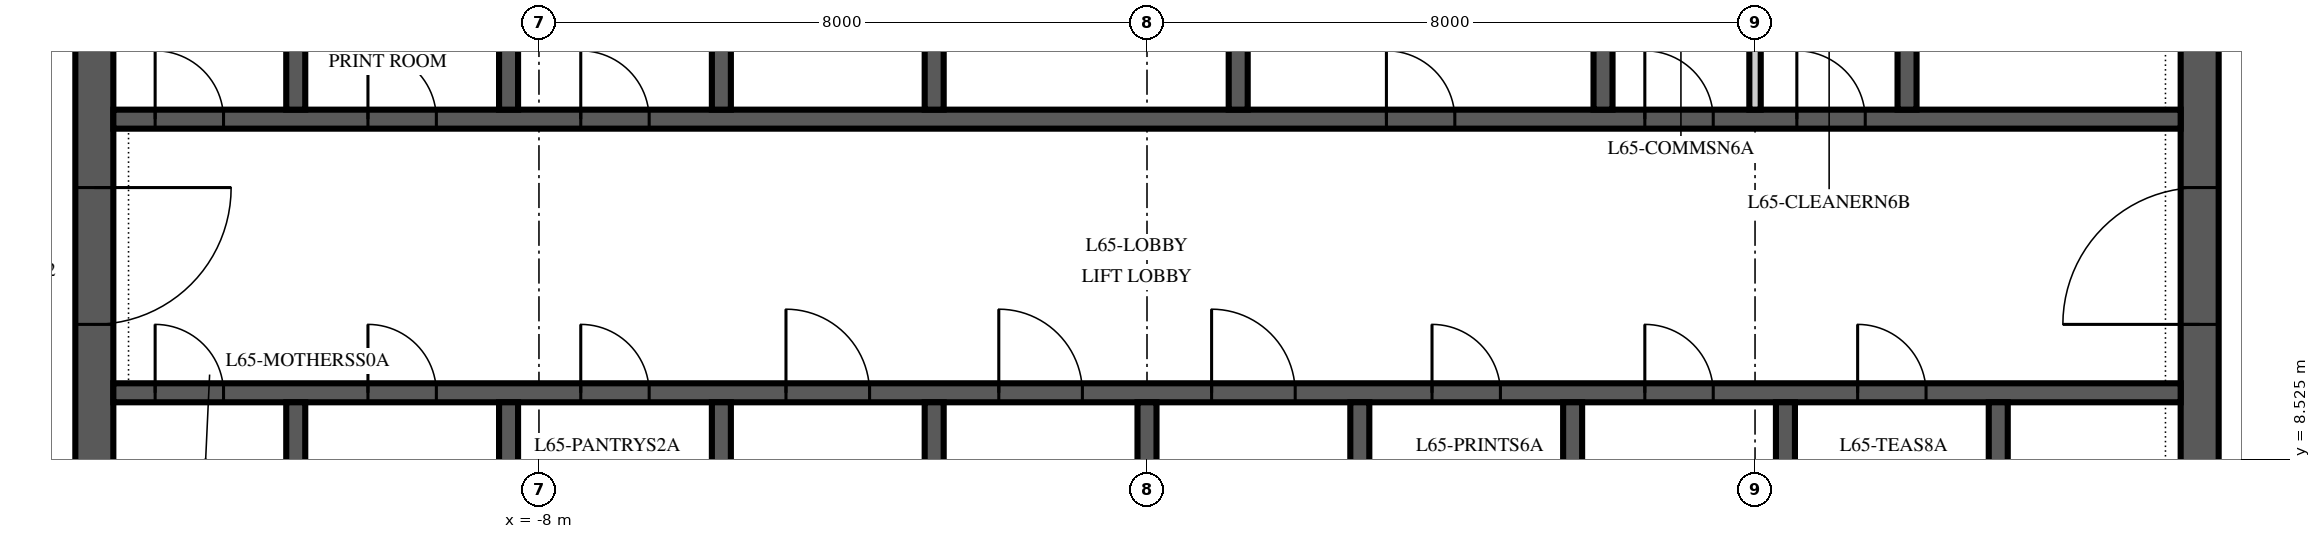
"""IFC4 building model, lengths in metres.
Left out: names, types, materials, properties, quantities, classifications, styles, units other than length and angle.
Written with IfcOpenShell. Run it as: python <this file> out.ifc"""

import sys

from ifc_helpers import new_model, si_unit, direction, frame, frame_2d, origin, place, context, subcontext, project, spatial, polyline, rectangle, outline, extrude, element, fill, save


model = new_model("IFC4")
c1 = context("Model", 3, precision=1e-05, world=origin(), true_north=direction((0.0, 1.0)))
c2 = subcontext(c1, "Body", "Model", "MODEL_VIEW")
j1 = project(units=[si_unit("LENGTHUNIT", "METRE"), si_unit("PLANEANGLEUNIT", "RADIAN")], contexts=[c1])
p1 = place(None, origin())
s1 = spatial("IfcSite", under=j1, at=p1, CompositionType="ELEMENT")
p2 = place(p1, origin())
s2 = spatial("IfcBuilding", under=s1, at=p2, CompositionType="ELEMENT")
p3 = place(p2, frame((0.0, 0.0, 280.0)))
s3 = spatial("IfcBuildingStorey", under=s2, at=p3, CompositionType="ELEMENT", Elevation=280.0)
p4 = place(p3, frame((13.85, 6.15, 0.0), z_axis=(0.0, 0.0, 1.0), x_axis=(0.0, 1.0, 0.0)))
e1 = element("IfcWall", 1, at=p4, inside=s3, PredefinedType="SHEAR", context=c2, shape_type="SweptSolid", body=[
    extrude(outline(polyline([(0.0, -0.25), (17.7, -0.25), (17.7, 0.0), (17.45, 0.0), (17.45, 0.25), (0.25, 0.25), (0.25, 0.0), (0.0, 0.0), (0.0, -0.25)])), origin(), (0.0, 0.0, 1.0), 4.0),
])
p5 = place(p4, frame((4.15, 0.0, 0.0)))
e2 = element("IfcOpeningElement", 2, at=p5, cuts=e1, PredefinedType="OPENING", context=c2, shape_type="SweptSolid", body=[
    extrude(rectangle(XDim=1.8, YDim=2.4, at=frame_2d((0.9, 1.2))), frame((0.0, 0.265, 0.0), z_axis=(0.0, -1.0, 0.0), x_axis=(1.0, 0.0, 0.0)), (0.0, 0.0, 1.0), 0.53),
])
p6 = place(p3, frame((-13.85, 23.85, 0.0), z_axis=(0.0, 0.0, 1.0), x_axis=(0.0, -1.0, 0.0)))
e3 = element("IfcWall", 3, at=p6, inside=s3, PredefinedType="SHEAR", context=c2, shape_type="SweptSolid", body=[
    extrude(outline(polyline([(0.0, -0.25), (17.7, -0.25), (17.7, 0.0), (17.45, 0.0), (17.45, 0.25), (0.25, 0.25), (0.25, 0.0), (0.0, 0.0), (0.0, -0.25)])), origin(), (0.0, 0.0, 1.0), 4.0),
])
p7 = place(p6, frame((11.75, 0.0, 0.0)))
e4 = element("IfcOpeningElement", 4, at=p7, cuts=e3, PredefinedType="OPENING", context=c2, shape_type="SweptSolid", body=[
    extrude(rectangle(XDim=1.8, YDim=2.4, at=frame_2d((0.9, 1.2))), frame((0.0, 0.265, 0.0), z_axis=(0.0, -1.0, 0.0), x_axis=(1.0, 0.0, 0.0)), (0.0, 0.0, 1.0), 0.53),
])
p8 = place(p3, frame((-13.6, 9.4, 0.0), z_axis=(0.0, 0.0, 1.0), x_axis=(1.0, 0.0, 0.0)))
e5 = element("IfcWall", 5, at=p8, inside=s3, PredefinedType="SHEAR", context=c2, shape_type="SweptSolid", body=[
    extrude(rectangle(XDim=27.2, YDim=0.25, at=frame_2d((13.6, 0.0))), origin(), (0.0, 0.0, 1.0), 4.0),
])
p9 = place(p8, frame((8.85, 0.0, 0.0)))
e6 = element("IfcOpeningElement", 6, at=p9, cuts=e5, PredefinedType="OPENING", context=c2, shape_type="SweptSolid", body=[
    extrude(rectangle(XDim=1.1, YDim=2.1, at=frame_2d((0.55, 1.05))), frame((0.0, 0.14, 0.0), z_axis=(0.0, -1.0, 0.0), x_axis=(1.0, 0.0, 0.0)), (0.0, 0.0, 1.0), 0.28),
])
p10 = place(p8, frame((11.65, 0.0, 0.0)))
e7 = element("IfcOpeningElement", 7, at=p10, cuts=e5, PredefinedType="OPENING", context=c2, shape_type="SweptSolid", body=[
    extrude(rectangle(XDim=1.1, YDim=2.1, at=frame_2d((0.55, 1.05))), frame((0.0, 0.14, 0.0), z_axis=(0.0, -1.0, 0.0), x_axis=(1.0, 0.0, 0.0)), (0.0, 0.0, 1.0), 0.28),
])
p11 = place(p8, frame((14.45, 0.0, 0.0)))
e8 = element("IfcOpeningElement", 8, at=p11, cuts=e5, PredefinedType="OPENING", context=c2, shape_type="SweptSolid", body=[
    extrude(rectangle(XDim=1.1, YDim=2.1, at=frame_2d((0.55, 1.05))), frame((0.0, 0.14, 0.0), z_axis=(0.0, -1.0, 0.0), x_axis=(1.0, 0.0, 0.0)), (0.0, 0.0, 1.0), 0.28),
])
p12 = place(p8, frame((0.55, 0.0, 0.0)))
e9 = element("IfcOpeningElement", 9, at=p12, cuts=e5, PredefinedType="OPENING", context=c2, shape_type="SweptSolid", body=[
    extrude(rectangle(XDim=0.9, YDim=2.1, at=frame_2d((0.45, 1.05))), frame((0.0, 0.14, 0.0), z_axis=(0.0, -1.0, 0.0), x_axis=(1.0, 0.0, 0.0)), (0.0, 0.0, 1.0), 0.28),
])
p13 = place(p8, frame((3.35, 0.0, 0.0)))
e10 = element("IfcOpeningElement", 10, at=p13, cuts=e5, PredefinedType="OPENING", context=c2, shape_type="SweptSolid", body=[
    extrude(rectangle(XDim=0.9, YDim=2.1, at=frame_2d((0.45, 1.05))), frame((0.0, 0.14, 0.0), z_axis=(0.0, -1.0, 0.0), x_axis=(1.0, 0.0, 0.0)), (0.0, 0.0, 1.0), 0.28),
])
p14 = place(p8, frame((6.15, 0.0, 0.0)))
e11 = element("IfcOpeningElement", 11, at=p14, cuts=e5, PredefinedType="OPENING", context=c2, shape_type="SweptSolid", body=[
    extrude(rectangle(XDim=0.9, YDim=2.1, at=frame_2d((0.45, 1.05))), frame((0.0, 0.14, 0.0), z_axis=(0.0, -1.0, 0.0), x_axis=(1.0, 0.0, 0.0)), (0.0, 0.0, 1.0), 0.28),
])
p15 = place(p8, frame((17.35, 0.0, 0.0)))
e12 = element("IfcOpeningElement", 12, at=p15, cuts=e5, PredefinedType="OPENING", context=c2, shape_type="SweptSolid", body=[
    extrude(rectangle(XDim=0.9, YDim=2.1, at=frame_2d((0.45, 1.05))), frame((0.0, 0.14, 0.0), z_axis=(0.0, -1.0, 0.0), x_axis=(1.0, 0.0, 0.0)), (0.0, 0.0, 1.0), 0.28),
])
p16 = place(p8, frame((20.15, 0.0, 0.0)))
e13 = element("IfcOpeningElement", 13, at=p16, cuts=e5, PredefinedType="OPENING", context=c2, shape_type="SweptSolid", body=[
    extrude(rectangle(XDim=0.9, YDim=2.1, at=frame_2d((0.45, 1.05))), frame((0.0, 0.14, 0.0), z_axis=(0.0, -1.0, 0.0), x_axis=(1.0, 0.0, 0.0)), (0.0, 0.0, 1.0), 0.28),
])
p17 = place(p8, frame((22.95, 0.0, 0.0)))
e14 = element("IfcOpeningElement", 14, at=p17, cuts=e5, PredefinedType="OPENING", context=c2, shape_type="SweptSolid", body=[
    extrude(rectangle(XDim=0.9, YDim=2.1, at=frame_2d((0.45, 1.05))), frame((0.0, 0.14, 0.0), z_axis=(0.0, -1.0, 0.0), x_axis=(1.0, 0.0, 0.0)), (0.0, 0.0, 1.0), 0.28),
])
p18 = place(p3, frame((-13.6, 13.0, 0.0), z_axis=(0.0, 0.0, 1.0), x_axis=(1.0, 0.0, 0.0)))
e15 = element("IfcWall", 15, at=p18, inside=s3, PredefinedType="SHEAR", context=c2, shape_type="SweptSolid", body=[
    extrude(rectangle(XDim=27.2, YDim=0.25, at=frame_2d((13.6, 0.0))), origin(), (0.0, 0.0, 1.0), 4.0),
])
p19 = place(p18, frame((16.75, 0.0, 0.0)))
e16 = element("IfcOpeningElement", 16, at=p19, cuts=e15, PredefinedType="OPENING", context=c2, shape_type="SweptSolid", body=[
    extrude(rectangle(XDim=0.9, YDim=2.1, at=frame_2d((0.45, 1.05))), frame((0.0, 0.14, 0.0), z_axis=(0.0, -1.0, 0.0), x_axis=(1.0, 0.0, 0.0)), (0.0, 0.0, 1.0), 0.28),
])
p20 = place(p18, frame((20.15, 0.0, 0.0)))
e17 = element("IfcOpeningElement", 17, at=p20, cuts=e15, PredefinedType="OPENING", context=c2, shape_type="SweptSolid", body=[
    extrude(rectangle(XDim=0.9, YDim=2.1, at=frame_2d((0.45, 1.05))), frame((0.0, 0.14, 0.0), z_axis=(0.0, -1.0, 0.0), x_axis=(1.0, 0.0, 0.0)), (0.0, 0.0, 1.0), 0.28),
])
p21 = place(p18, frame((22.15, 0.0, 0.0)))
e18 = element("IfcOpeningElement", 18, at=p21, cuts=e15, PredefinedType="OPENING", context=c2, shape_type="SweptSolid", body=[
    extrude(rectangle(XDim=0.9, YDim=2.1, at=frame_2d((0.45, 1.05))), frame((0.0, 0.14, 0.0), z_axis=(0.0, -1.0, 0.0), x_axis=(1.0, 0.0, 0.0)), (0.0, 0.0, 1.0), 0.28),
])
p22 = place(p18, frame((0.55, 0.0, 0.0)))
e19 = element("IfcOpeningElement", 19, at=p22, cuts=e15, PredefinedType="OPENING", context=c2, shape_type="SweptSolid", body=[
    extrude(rectangle(XDim=0.9, YDim=2.1, at=frame_2d((0.45, 1.05))), frame((0.0, 0.14, 0.0), z_axis=(0.0, -1.0, 0.0), x_axis=(1.0, 0.0, 0.0)), (0.0, 0.0, 1.0), 0.28),
])
p23 = place(p18, frame((3.35, 0.0, 0.0)))
e20 = element("IfcOpeningElement", 20, at=p23, cuts=e15, PredefinedType="OPENING", context=c2, shape_type="SweptSolid", body=[
    extrude(rectangle(XDim=0.9, YDim=2.1, at=frame_2d((0.45, 1.05))), frame((0.0, 0.14, 0.0), z_axis=(0.0, -1.0, 0.0), x_axis=(1.0, 0.0, 0.0)), (0.0, 0.0, 1.0), 0.28),
])
p24 = place(p18, frame((6.15, 0.0, 0.0)))
e21 = element("IfcOpeningElement", 21, at=p24, cuts=e15, PredefinedType="OPENING", context=c2, shape_type="SweptSolid", body=[
    extrude(rectangle(XDim=0.9, YDim=2.1, at=frame_2d((0.45, 1.05))), frame((0.0, 0.14, 0.0), z_axis=(0.0, -1.0, 0.0), x_axis=(1.0, 0.0, 0.0)), (0.0, 0.0, 1.0), 0.28),
])
for number, where, z_axis, x_axis in (
    (22, (-11.2, 6.4, 0.0), (0.0, 0.0, 1.0), (0.0, 1.0, 0.0)),
    (23, (-8.4, 6.4, 0.0), (0.0, 0.0, 1.0), (0.0, 1.0, 0.0)),
    (24, (-5.6, 6.4, 0.0), (0.0, 0.0, 1.0), (0.0, 1.0, 0.0)),
    (25, (-2.8, 6.4, 0.0), (0.0, 0.0, 1.0), (0.0, 1.0, 0.0)),
    (26, (0.0, 6.4, 0.0), (0.0, 0.0, 1.0), (0.0, 1.0, 0.0)),
    (27, (2.8, 6.4, 0.0), (0.0, 0.0, 1.0), (0.0, 1.0, 0.0)),
    (28, (5.6, 6.4, 0.0), (0.0, 0.0, 1.0), (0.0, 1.0, 0.0)),
    (29, (8.4, 6.4, 0.0), (0.0, 0.0, 1.0), (0.0, 1.0, 0.0)),
    (30, (11.2, 6.4, 0.0), (0.0, 0.0, 1.0), (0.0, 1.0, 0.0)),
):
    element("IfcWall", number, at=place(p3, frame(where, z_axis=z_axis, x_axis=x_axis)), inside=s3, PredefinedType="SHEAR", context=c2, shape_type="SweptSolid", body=[
        extrude(rectangle(XDim=2.875, YDim=0.25, at=frame_2d((1.438, 0.0))), origin(), (0.0, 0.0, 1.0), 4.0),
    ])
for number, where, z_axis, x_axis in (
    (31, (-11.2, 13.125, 0.0), (0.0, 0.0, 1.0), (0.0, 1.0, 0.0)),
    (32, (-8.4, 13.125, 0.0), (0.0, 0.0, 1.0), (0.0, 1.0, 0.0)),
    (33, (-5.6, 13.125, 0.0), (0.0, 0.0, 1.0), (0.0, 1.0, 0.0)),
    (34, (-2.8, 13.125, 0.0), (0.0, 0.0, 1.0), (0.0, 1.0, 0.0)),
    (35, (1.2, 13.125, 0.0), (0.0, 0.0, 1.0), (0.0, 1.0, 0.0)),
    (36, (6.0, 13.125, 0.0), (0.0, 0.0, 1.0), (0.0, 1.0, 0.0)),
    (37, (10.0, 13.125, 0.0), (0.0, 0.0, 1.0), (0.0, 1.0, 0.0)),
):
    element("IfcWall", number, at=place(p3, frame(where, z_axis=z_axis, x_axis=x_axis)), inside=s3, PredefinedType="SHEAR", context=c2, shape_type="SweptSolid", body=[
        extrude(rectangle(XDim=2.75, YDim=0.25, at=frame_2d((1.375, 0.0))), origin(), (0.0, 0.0, 1.0), 4.0),
    ])
p25 = place(p3, frame((8.0, 13.125, 0.0), z_axis=(0.0, 0.0, 1.0), x_axis=(0.0, 1.0, 0.0)))
e38 = element("IfcWall", 38, at=p25, inside=s3, PredefinedType="PARTITIONING", context=c2, shape_type="SweptSolid", body=[
    extrude(rectangle(XDim=2.75, YDim=0.15, at=frame_2d((1.375, 0.0))), origin(), (0.0, 0.0, 1.0), 3.85),
])
p26 = place(p5, origin())
e39 = element("IfcDoor", 39, at=p26, inside=s3, OperationType="DOUBLE_DOOR_SINGLE_SWING", PredefinedType="DOOR", context=c2, shape_type="SweptSolid", body=[
    extrude(rectangle(XDim=1.8, YDim=2.4, at=frame_2d((0.9, 1.2))), frame((0.0, 0.25, 0.0), z_axis=(0.0, -1.0, 0.0), x_axis=(1.0, 0.0, 0.0)), (0.0, 0.0, 1.0), 0.5),
])
fill(e2, e39)
p27 = place(p7, origin())
e40 = element("IfcDoor", 40, at=p27, inside=s3, OperationType="DOUBLE_DOOR_SINGLE_SWING", PredefinedType="DOOR", context=c2, shape_type="SweptSolid", body=[
    extrude(rectangle(XDim=1.8, YDim=2.4, at=frame_2d((0.9, 1.2))), frame((0.0, 0.25, 0.0), z_axis=(0.0, -1.0, 0.0), x_axis=(1.0, 0.0, 0.0)), (0.0, 0.0, 1.0), 0.5),
])
fill(e4, e40)
p28 = place(p9, origin())
e41 = element("IfcDoor", 41, at=p28, inside=s3, OperationType="SLIDING_TO_LEFT", PredefinedType="DOOR", context=c2, shape_type="SweptSolid", body=[
    extrude(rectangle(XDim=1.1, YDim=2.1, at=frame_2d((0.55, 1.05))), frame((0.0, 0.125, 0.0), z_axis=(0.0, -1.0, 0.0), x_axis=(1.0, 0.0, 0.0)), (0.0, 0.0, 1.0), 0.25),
])
fill(e6, e41)
p29 = place(p10, origin())
e42 = element("IfcDoor", 42, at=p29, inside=s3, OperationType="SLIDING_TO_LEFT", PredefinedType="DOOR", context=c2, shape_type="SweptSolid", body=[
    extrude(rectangle(XDim=1.1, YDim=2.1, at=frame_2d((0.55, 1.05))), frame((0.0, 0.125, 0.0), z_axis=(0.0, -1.0, 0.0), x_axis=(1.0, 0.0, 0.0)), (0.0, 0.0, 1.0), 0.25),
])
fill(e7, e42)
p30 = place(p11, origin())
e43 = element("IfcDoor", 43, at=p30, inside=s3, OperationType="SLIDING_TO_LEFT", PredefinedType="DOOR", context=c2, shape_type="SweptSolid", body=[
    extrude(rectangle(XDim=1.1, YDim=2.1, at=frame_2d((0.55, 1.05))), frame((0.0, 0.125, 0.0), z_axis=(0.0, -1.0, 0.0), x_axis=(1.0, 0.0, 0.0)), (0.0, 0.0, 1.0), 0.25),
])
fill(e8, e43)
p31 = place(p19, origin())
e44 = element("IfcDoor", 44, at=p31, inside=s3, OperationType="SINGLE_SWING_LEFT", PredefinedType="DOOR", context=c2, shape_type="SweptSolid", body=[
    extrude(rectangle(XDim=0.9, YDim=2.1, at=frame_2d((0.45, 1.05))), frame((0.0, 0.125, 0.0), z_axis=(0.0, -1.0, 0.0), x_axis=(1.0, 0.0, 0.0)), (0.0, 0.0, 1.0), 0.25),
])
fill(e16, e44)
p32 = place(p20, origin())
e45 = element("IfcDoor", 45, at=p32, inside=s3, OperationType="SINGLE_SWING_LEFT", PredefinedType="DOOR", context=c2, shape_type="SweptSolid", body=[
    extrude(rectangle(XDim=0.9, YDim=2.1, at=frame_2d((0.45, 1.05))), frame((0.0, 0.125, 0.0), z_axis=(0.0, -1.0, 0.0), x_axis=(1.0, 0.0, 0.0)), (0.0, 0.0, 1.0), 0.25),
])
fill(e17, e45)
p33 = place(p21, origin())
e46 = element("IfcDoor", 46, at=p33, inside=s3, OperationType="SINGLE_SWING_LEFT", PredefinedType="DOOR", context=c2, shape_type="SweptSolid", body=[
    extrude(rectangle(XDim=0.9, YDim=2.1, at=frame_2d((0.45, 1.05))), frame((0.0, 0.125, 0.0), z_axis=(0.0, -1.0, 0.0), x_axis=(1.0, 0.0, 0.0)), (0.0, 0.0, 1.0), 0.25),
])
fill(e18, e46)
p34 = place(p22, origin())
e47 = element("IfcDoor", 47, at=p34, inside=s3, OperationType="SINGLE_SWING_LEFT", PredefinedType="DOOR", context=c2, shape_type="SweptSolid", body=[
    extrude(rectangle(XDim=0.9, YDim=2.1, at=frame_2d((0.45, 1.05))), frame((0.0, 0.125, 0.0), z_axis=(0.0, -1.0, 0.0), x_axis=(1.0, 0.0, 0.0)), (0.0, 0.0, 1.0), 0.25),
])
fill(e19, e47)
p35 = place(p23, origin())
e48 = element("IfcDoor", 48, at=p35, inside=s3, OperationType="SINGLE_SWING_LEFT", PredefinedType="DOOR", context=c2, shape_type="SweptSolid", body=[
    extrude(rectangle(XDim=0.9, YDim=2.1, at=frame_2d((0.45, 1.05))), frame((0.0, 0.125, 0.0), z_axis=(0.0, -1.0, 0.0), x_axis=(1.0, 0.0, 0.0)), (0.0, 0.0, 1.0), 0.25),
])
fill(e20, e48)
p36 = place(p24, origin())
e49 = element("IfcDoor", 49, at=p36, inside=s3, OperationType="SINGLE_SWING_LEFT", PredefinedType="DOOR", context=c2, shape_type="SweptSolid", body=[
    extrude(rectangle(XDim=0.9, YDim=2.1, at=frame_2d((0.45, 1.05))), frame((0.0, 0.125, 0.0), z_axis=(0.0, -1.0, 0.0), x_axis=(1.0, 0.0, 0.0)), (0.0, 0.0, 1.0), 0.25),
])
fill(e21, e49)
p37 = place(p12, origin())
e50 = element("IfcDoor", 50, at=p37, inside=s3, OperationType="SINGLE_SWING_LEFT", PredefinedType="DOOR", context=c2, shape_type="SweptSolid", body=[
    extrude(rectangle(XDim=0.9, YDim=2.1, at=frame_2d((0.45, 1.05))), frame((0.0, 0.125, 0.0), z_axis=(0.0, -1.0, 0.0), x_axis=(1.0, 0.0, 0.0)), (0.0, 0.0, 1.0), 0.25),
])
fill(e9, e50)
p38 = place(p13, origin())
e51 = element("IfcDoor", 51, at=p38, inside=s3, OperationType="SINGLE_SWING_LEFT", PredefinedType="DOOR", context=c2, shape_type="SweptSolid", body=[
    extrude(rectangle(XDim=0.9, YDim=2.1, at=frame_2d((0.45, 1.05))), frame((0.0, 0.125, 0.0), z_axis=(0.0, -1.0, 0.0), x_axis=(1.0, 0.0, 0.0)), (0.0, 0.0, 1.0), 0.25),
])
fill(e10, e51)
p39 = place(p14, origin())
e52 = element("IfcDoor", 52, at=p39, inside=s3, OperationType="SINGLE_SWING_LEFT", PredefinedType="DOOR", context=c2, shape_type="SweptSolid", body=[
    extrude(rectangle(XDim=0.9, YDim=2.1, at=frame_2d((0.45, 1.05))), frame((0.0, 0.125, 0.0), z_axis=(0.0, -1.0, 0.0), x_axis=(1.0, 0.0, 0.0)), (0.0, 0.0, 1.0), 0.25),
])
fill(e11, e52)
p40 = place(p15, origin())
e53 = element("IfcDoor", 53, at=p40, inside=s3, OperationType="SINGLE_SWING_LEFT", PredefinedType="DOOR", context=c2, shape_type="SweptSolid", body=[
    extrude(rectangle(XDim=0.9, YDim=2.1, at=frame_2d((0.45, 1.05))), frame((0.0, 0.125, 0.0), z_axis=(0.0, -1.0, 0.0), x_axis=(1.0, 0.0, 0.0)), (0.0, 0.0, 1.0), 0.25),
])
fill(e12, e53)
p41 = place(p16, origin())
e54 = element("IfcDoor", 54, at=p41, inside=s3, OperationType="SINGLE_SWING_LEFT", PredefinedType="DOOR", context=c2, shape_type="SweptSolid", body=[
    extrude(rectangle(XDim=0.9, YDim=2.1, at=frame_2d((0.45, 1.05))), frame((0.0, 0.125, 0.0), z_axis=(0.0, -1.0, 0.0), x_axis=(1.0, 0.0, 0.0)), (0.0, 0.0, 1.0), 0.25),
])
fill(e13, e54)
p42 = place(p17, origin())
e55 = element("IfcDoor", 55, at=p42, inside=s3, OperationType="SINGLE_SWING_LEFT", PredefinedType="DOOR", context=c2, shape_type="SweptSolid", body=[
    extrude(rectangle(XDim=0.9, YDim=2.1, at=frame_2d((0.45, 1.05))), frame((0.0, 0.125, 0.0), z_axis=(0.0, -1.0, 0.0), x_axis=(1.0, 0.0, 0.0)), (0.0, 0.0, 1.0), 0.25),
])
fill(e14, e55)
save(model, sys.argv[1])
